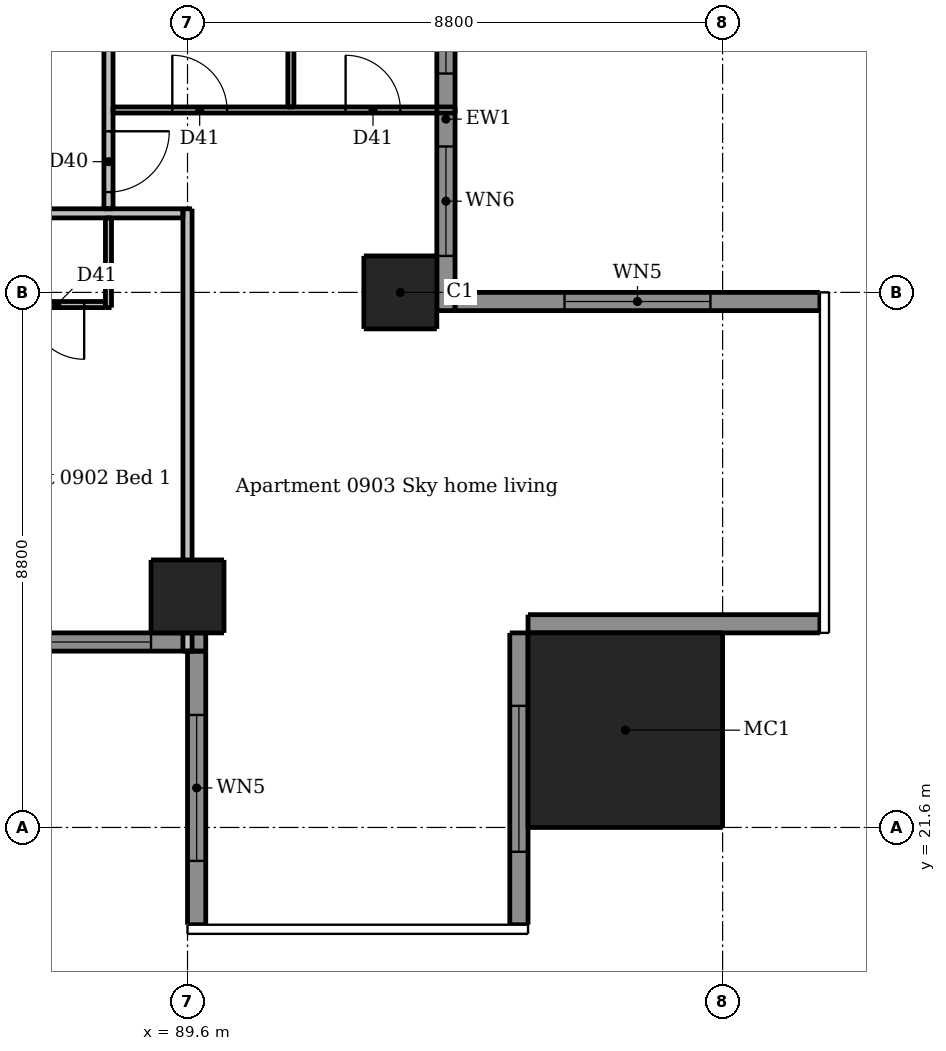
"""IFC4 building model, lengths in metres.
Left out: names, types, materials, properties, quantities, classifications, styles, units other than length and angle.
Written with IfcOpenShell. Run it as: python <this file> out.ifc"""

import sys

from ifc_helpers import new_model, si_unit, direction, frame, frame_2d, origin, origin_2d, place, context, subcontext, project, spatial, rectangle, extrude, element, fill, save


model = new_model("IFC4")
c1 = context("Model", 3, precision=1e-05, world=origin(), true_north=direction((0.0, 1.0)))
c2 = subcontext(c1, "Body", "Model", "MODEL_VIEW")
j1 = project(units=[si_unit("LENGTHUNIT", "METRE"), si_unit("PLANEANGLEUNIT", "RADIAN")], contexts=[c1])
p1 = place(None, origin())
s1 = spatial("IfcSite", under=j1, at=p1, CompositionType="ELEMENT")
p2 = place(p1, origin())
s2 = spatial("IfcBuilding", under=s1, at=p2, CompositionType="ELEMENT")
p3 = place(p2, frame((0.0, 0.0, 36.7)))
s3 = spatial("IfcBuildingStorey", under=s2, at=p3, CompositionType="ELEMENT", Elevation=36.7)
for number, where, z_axis, x_axis in (
    (1, (89.6, 25.4, 0.0), (0.0, 0.0, 1.0), (1.0, 0.0, 0.0)),
    (2, (93.1, 30.4, 0.0), (0.0, 0.0, 1.0), (1.0, 0.0, 0.0)),
):
    element("IfcColumn", number, at=place(p3, frame(where, z_axis=z_axis, x_axis=x_axis)), inside=s3, PredefinedType="COLUMN", context=c2, shape_type="SweptSolid", body=[
        extrude(rectangle(XDim=1.2, YDim=1.2, at=origin_2d()), origin(), (0.0, 0.0, 1.0), 3.05),
    ])
p4 = place(p3, frame((96.8, 23.2, 0.0), z_axis=(0.0, 0.0, 1.0), x_axis=(1.0, 0.0, 0.0)))
e3 = element("IfcColumn", 3, at=p4, inside=s3, PredefinedType="COLUMN", context=c2, shape_type="SweptSolid", body=[
    extrude(rectangle(XDim=3.2, YDim=3.2, at=origin_2d()), origin(), (0.0, 0.0, 1.0), 3.3),
])
p5 = place(p3, frame((89.75, 24.5, 0.0), z_axis=(0.0, 0.0, 1.0), x_axis=(0.0, -1.0, 0.0)))
e4 = element("IfcWall", 4, at=p5, inside=s3, PredefinedType="SOLIDWALL", context=c2, shape_type="SweptSolid", body=[
    extrude(rectangle(XDim=4.5, YDim=0.3, at=frame_2d((2.25, 0.0))), origin(), (0.0, 0.0, 1.0), 3.05),
])
p6 = place(p5, frame((1.05, 0.0, 0.15)))
e5 = element("IfcOpeningElement", 5, at=p6, cuts=e4, PredefinedType="OPENING", context=c2, shape_type="SweptSolid", body=[
    extrude(rectangle(XDim=2.4, YDim=2.1, at=frame_2d((1.2, 1.05))), frame((0.0, 0.16, 0.0), z_axis=(0.0, -1.0, 0.0), x_axis=(1.0, 0.0, 0.0)), (0.0, 0.0, 1.0), 0.32),
])
p7 = place(p3, frame((95.05, 20.0, 0.0), z_axis=(0.0, 0.0, 1.0), x_axis=(0.0, 1.0, 0.0)))
e6 = element("IfcWall", 6, at=p7, inside=s3, PredefinedType="SOLIDWALL", context=c2, shape_type="SweptSolid", body=[
    extrude(rectangle(XDim=4.8, YDim=0.3, at=frame_2d((2.4, 0.0))), origin(), (0.0, 0.0, 1.0), 3.05),
])
p8 = place(p7, frame((1.2, 0.0, 0.15)))
e7 = element("IfcOpeningElement", 7, at=p8, cuts=e6, PredefinedType="OPENING", context=c2, shape_type="SweptSolid", body=[
    extrude(rectangle(XDim=2.4, YDim=2.1, at=frame_2d((1.2, 1.05))), frame((0.0, 0.16, 0.0), z_axis=(0.0, -1.0, 0.0), x_axis=(1.0, 0.0, 0.0)), (0.0, 0.0, 1.0), 0.32),
])
p9 = place(p3, frame((95.2, 24.95, 0.0), z_axis=(0.0, 0.0, 1.0), x_axis=(1.0, 0.0, 0.0)))
e8 = element("IfcWall", 8, at=p9, inside=s3, PredefinedType="SOLIDWALL", context=c2, shape_type="SweptSolid", body=[
    extrude(rectangle(XDim=4.8, YDim=0.3, at=frame_2d((2.4, 0.0))), origin(), (0.0, 0.0, 1.0), 3.05),
])
p10 = place(p3, frame((100.0, 30.25, 0.0), z_axis=(0.0, 0.0, 1.0), x_axis=(-1.0, 0.0, 0.0)))
e9 = element("IfcWall", 9, at=p10, inside=s3, PredefinedType="SOLIDWALL", context=c2, shape_type="SweptSolid", body=[
    extrude(rectangle(XDim=6.0, YDim=0.3, at=frame_2d((3.0, 0.0))), origin(), (0.0, 0.0, 1.0), 3.05),
])
p11 = place(p10, frame((1.8, 0.0, 0.15)))
e10 = element("IfcOpeningElement", 10, at=p11, cuts=e9, PredefinedType="OPENING", context=c2, shape_type="SweptSolid", body=[
    extrude(rectangle(XDim=2.4, YDim=2.1, at=frame_2d((1.2, 1.05))), frame((0.0, 0.16, 0.0), z_axis=(0.0, -1.0, 0.0), x_axis=(1.0, 0.0, 0.0)), (0.0, 0.0, 1.0), 0.32),
])
p12 = place(p3, frame((83.6, 24.65, 0.0), z_axis=(0.0, 0.0, 1.0), x_axis=(1.0, 0.0, 0.0)))
e11 = element("IfcWall", 11, at=p12, inside=s3, PredefinedType="SOLIDWALL", context=c2, shape_type="SweptSolid", body=[
    extrude(rectangle(XDim=6.3, YDim=0.3, at=frame_2d((3.15, 0.0))), origin(), (0.0, 0.0, 1.0), 3.05),
])
p13 = place(p12, frame((0.6, 0.0, 0.15)))
e12 = element("IfcOpeningElement", 12, at=p13, cuts=e11, PredefinedType="OPENING", context=c2, shape_type="SweptSolid", body=[
    extrude(rectangle(XDim=1.8, YDim=2.1, at=frame_2d((0.9, 1.05))), frame((0.0, 0.16, 0.0), z_axis=(0.0, -1.0, 0.0), x_axis=(1.0, 0.0, 0.0)), (0.0, 0.0, 1.0), 0.32),
])
p14 = place(p12, frame((3.6, 0.0, 0.15)))
e13 = element("IfcOpeningElement", 13, at=p14, cuts=e11, PredefinedType="OPENING", context=c2, shape_type="SweptSolid", body=[
    extrude(rectangle(XDim=1.8, YDim=2.1, at=frame_2d((0.9, 1.05))), frame((0.0, 0.16, 0.0), z_axis=(0.0, -1.0, 0.0), x_axis=(1.0, 0.0, 0.0)), (0.0, 0.0, 1.0), 0.32),
])
p15 = place(p3, frame((93.85, 30.1, 0.0), z_axis=(0.0, 0.0, 1.0), x_axis=(0.0, 1.0, 0.0)))
e14 = element("IfcWall", 14, at=p15, inside=s3, PredefinedType="SOLIDWALL", context=c2, shape_type="SweptSolid", body=[
    extrude(rectangle(XDim=6.3, YDim=0.3, at=frame_2d((3.15, 0.0))), origin(), (0.0, 0.0, 1.0), 3.05),
])
p16 = place(p15, frame((0.9, 0.0, 0.15)))
e15 = element("IfcOpeningElement", 15, at=p16, cuts=e14, PredefinedType="OPENING", context=c2, shape_type="SweptSolid", body=[
    extrude(rectangle(XDim=1.8, YDim=2.1, at=frame_2d((0.9, 1.05))), frame((0.0, 0.16, 0.0), z_axis=(0.0, -1.0, 0.0), x_axis=(1.0, 0.0, 0.0)), (0.0, 0.0, 1.0), 0.32),
])
p17 = place(p15, frame((3.9, 0.0, 0.15)))
e16 = element("IfcOpeningElement", 16, at=p17, cuts=e14, PredefinedType="OPENING", context=c2, shape_type="SweptSolid", body=[
    extrude(rectangle(XDim=1.8, YDim=2.1, at=frame_2d((0.9, 1.05))), frame((0.0, 0.16, 0.0), z_axis=(0.0, -1.0, 0.0), x_axis=(1.0, 0.0, 0.0)), (0.0, 0.0, 1.0), 0.32),
])
p18 = place(p3, frame((88.3, 30.15, 0.0), z_axis=(0.0, 0.0, 1.0), x_axis=(0.0, 1.0, 0.0)))
e17 = element("IfcWall", 17, at=p18, inside=s3, PredefinedType="PARTITIONING", context=c2, shape_type="SweptSolid", body=[
    extrude(rectangle(XDim=1.475, YDim=0.1, at=frame_2d((0.738, 0.0))), origin(), (0.0, 0.0, 1.0), 3.05),
])
p19 = place(p3, frame((91.3, 33.45, 0.0), z_axis=(0.0, 0.0, 1.0), x_axis=(0.0, 1.0, 0.0)))
e18 = element("IfcWall", 18, at=p19, inside=s3, PredefinedType="PARTITIONING", context=c2, shape_type="SweptSolid", body=[
    extrude(rectangle(XDim=5.875, YDim=0.1, at=frame_2d((2.938, 0.0))), origin(), (0.0, 0.0, 1.0), 3.05),
])
p20 = place(p19, frame((3.75, 0.0, 0.0)))
e19 = element("IfcOpeningElement", 19, at=p20, cuts=e18, PredefinedType="OPENING", context=c2, shape_type="SweptSolid", body=[
    extrude(rectangle(XDim=0.8, YDim=2.1, at=frame_2d((0.4, 1.05))), frame((0.0, 0.06, 0.0), z_axis=(0.0, -1.0, 0.0), x_axis=(1.0, 0.0, 0.0)), (0.0, 0.0, 1.0), 0.12),
])
p21 = place(p3, frame((88.375, 33.4, 0.0), z_axis=(0.0, 0.0, 1.0), x_axis=(1.0, 0.0, 0.0)))
e20 = element("IfcWall", 20, at=p21, inside=s3, PredefinedType="PARTITIONING", context=c2, shape_type="SweptSolid", body=[
    extrude(rectangle(XDim=5.625, YDim=0.1, at=frame_2d((2.812, 0.0))), origin(), (0.0, 0.0, 1.0), 3.05),
])
p22 = place(p21, frame((0.975, 0.0, 0.0)))
e21 = element("IfcOpeningElement", 21, at=p22, cuts=e20, PredefinedType="OPENING", context=c2, shape_type="SweptSolid", body=[
    extrude(rectangle(XDim=0.9, YDim=2.1, at=frame_2d((0.45, 1.05))), frame((0.0, 0.06, 0.0), z_axis=(0.0, -1.0, 0.0), x_axis=(1.0, 0.0, 0.0)), (0.0, 0.0, 1.0), 0.12),
])
p23 = place(p21, frame((3.825, 0.0, 0.0)))
e22 = element("IfcOpeningElement", 22, at=p23, cuts=e20, PredefinedType="OPENING", context=c2, shape_type="SweptSolid", body=[
    extrude(rectangle(XDim=0.9, YDim=2.1, at=frame_2d((0.45, 1.05))), frame((0.0, 0.06, 0.0), z_axis=(0.0, -1.0, 0.0), x_axis=(1.0, 0.0, 0.0)), (0.0, 0.0, 1.0), 0.12),
])
p24 = place(p3, frame((88.25, 30.2, 0.0), z_axis=(0.0, 0.0, 1.0), x_axis=(-1.0, 0.0, 0.0)))
e23 = element("IfcWall", 23, at=p24, inside=s3, PredefinedType="PARTITIONING", context=c2, shape_type="SweptSolid", body=[
    extrude(rectangle(XDim=13.575, YDim=0.1, at=frame_2d((6.788, 0.0))), origin(), (0.0, 0.0, 1.0), 3.05),
])
p25 = place(p24, frame((7.5, 0.0, 0.0)))
e24 = element("IfcOpeningElement", 24, at=p25, cuts=e23, PredefinedType="OPENING", context=c2, shape_type="SweptSolid", body=[
    extrude(rectangle(XDim=0.9, YDim=2.1, at=frame_2d((0.45, 1.05))), frame((0.0, 0.06, 0.0), z_axis=(0.0, -1.0, 0.0), x_axis=(1.0, 0.0, 0.0)), (0.0, 0.0, 1.0), 0.12),
])
p26 = place(p24, frame((2.7, 0.0, 0.0)))
e25 = element("IfcOpeningElement", 25, at=p26, cuts=e23, PredefinedType="OPENING", context=c2, shape_type="SweptSolid", body=[
    extrude(rectangle(XDim=0.9, YDim=2.1, at=frame_2d((0.45, 1.05))), frame((0.0, 0.06, 0.0), z_axis=(0.0, -1.0, 0.0), x_axis=(1.0, 0.0, 0.0)), (0.0, 0.0, 1.0), 0.12),
])
p27 = place(p24, frame((0.35, 0.0, 0.0)))
e26 = element("IfcOpeningElement", 26, at=p27, cuts=e23, PredefinedType="OPENING", context=c2, shape_type="SweptSolid", body=[
    extrude(rectangle(XDim=0.9, YDim=2.1, at=frame_2d((0.45, 1.05))), frame((0.0, 0.06, 0.0), z_axis=(0.0, -1.0, 0.0), x_axis=(1.0, 0.0, 0.0)), (0.0, 0.0, 1.0), 0.12),
])
p28 = place(p24, frame((12.05, 0.0, 0.0)))
e27 = element("IfcOpeningElement", 27, at=p28, cuts=e23, PredefinedType="OPENING", context=c2, shape_type="SweptSolid", body=[
    extrude(rectangle(XDim=0.8, YDim=2.1, at=frame_2d((0.4, 1.05))), frame((0.0, 0.06, 0.0), z_axis=(0.0, -1.0, 0.0), x_axis=(1.0, 0.0, 0.0)), (0.0, 0.0, 1.0), 0.12),
])
p29 = place(p3, frame((88.3, 60.475, 0.0), z_axis=(0.0, 0.0, 1.0), x_axis=(0.0, -1.0, 0.0)))
e28 = element("IfcWall", 28, at=p29, inside=s3, PredefinedType="PARTITIONING", context=c2, shape_type="SweptSolid", body=[
    extrude(rectangle(XDim=28.7, YDim=0.15, at=frame_2d((14.35, 0.0))), origin(), (0.0, 0.0, 1.0), 3.05),
])
p30 = place(p29, frame((27.425, 0.0, 0.0)))
e29 = element("IfcOpeningElement", 29, at=p30, cuts=e28, PredefinedType="OPENING", context=c2, shape_type="SweptSolid", body=[
    extrude(rectangle(XDim=1.0, YDim=2.1, at=frame_2d((0.5, 1.05))), frame((0.0, 0.085, 0.0), z_axis=(0.0, -1.0, 0.0), x_axis=(1.0, 0.0, 0.0)), (0.0, 0.0, 1.0), 0.17),
])
p31 = place(p29, frame((10.625, 0.0, 0.0)))
e30 = element("IfcOpeningElement", 30, at=p31, cuts=e28, PredefinedType="OPENING", context=c2, shape_type="SweptSolid", body=[
    extrude(rectangle(XDim=1.0, YDim=2.1, at=frame_2d((0.5, 1.05))), frame((0.0, 0.085, 0.0), z_axis=(0.0, -1.0, 0.0), x_axis=(1.0, 0.0, 0.0)), (0.0, 0.0, 1.0), 0.17),
])
p32 = place(p3, frame((89.6, 24.5, 0.0), z_axis=(0.0, 0.0, 1.0), x_axis=(0.0, 1.0, 0.0)))
e31 = element("IfcWall", 31, at=p32, inside=s3, PredefinedType="PARTITIONING", context=c2, shape_type="SweptSolid", body=[
    extrude(rectangle(XDim=7.275, YDim=0.15, at=frame_2d((3.637, 0.0))), origin(), (0.0, 0.0, 1.0), 2.516),
])
p33 = place(p3, frame((89.525, 31.7, 0.0), z_axis=(0.0, 0.0, 1.0), x_axis=(-1.0, 0.0, 0.0)))
e32 = element("IfcWall", 32, at=p33, inside=s3, PredefinedType="PARTITIONING", context=c2, shape_type="SweptSolid", body=[
    extrude(rectangle(XDim=28.75, YDim=0.15, at=frame_2d((14.375, 0.0))), origin(), (0.0, 0.0, 1.0), 3.05),
])
p34 = place(p33, frame((24.475, 0.0, 0.0)))
e33 = element("IfcOpeningElement", 33, at=p34, cuts=e32, PredefinedType="OPENING", context=c2, shape_type="SweptSolid", body=[
    extrude(rectangle(XDim=1.0, YDim=2.1, at=frame_2d((0.5, 1.05))), frame((0.0, 0.085, 0.0), z_axis=(0.0, -1.0, 0.0), x_axis=(1.0, 0.0, 0.0)), (0.0, 0.0, 1.0), 0.17),
])
p35 = place(p33, frame((7.575, 0.0, 0.0)))
e34 = element("IfcOpeningElement", 34, at=p35, cuts=e32, PredefinedType="OPENING", context=c2, shape_type="SweptSolid", body=[
    extrude(rectangle(XDim=1.0, YDim=2.1, at=frame_2d((0.5, 1.05))), frame((0.0, 0.085, 0.0), z_axis=(0.0, -1.0, 0.0), x_axis=(1.0, 0.0, 0.0)), (0.0, 0.0, 1.0), 0.17),
])
p36 = place(p6, origin())
e35 = element("IfcWindow", 35, at=p36, inside=s3, PartitioningType="DOUBLE_PANEL_VERTICAL", PredefinedType="WINDOW", context=c2, shape_type="SweptSolid", body=[
    extrude(rectangle(XDim=2.4, YDim=2.1, at=frame_2d((1.2, 1.05))), frame((0.0, 0.03, 0.0), z_axis=(0.0, -1.0, 0.0), x_axis=(1.0, 0.0, 0.0)), (0.0, 0.0, 1.0), 0.06),
])
fill(e5, e35)
p37 = place(p8, origin())
e36 = element("IfcWindow", 36, at=p37, inside=s3, PartitioningType="DOUBLE_PANEL_VERTICAL", PredefinedType="WINDOW", context=c2, shape_type="SweptSolid", body=[
    extrude(rectangle(XDim=2.4, YDim=2.1, at=frame_2d((1.2, 1.05))), frame((0.0, 0.03, 0.0), z_axis=(0.0, -1.0, 0.0), x_axis=(1.0, 0.0, 0.0)), (0.0, 0.0, 1.0), 0.06),
])
fill(e7, e36)
p38 = place(p11, origin())
e37 = element("IfcWindow", 37, at=p38, inside=s3, PartitioningType="DOUBLE_PANEL_VERTICAL", PredefinedType="WINDOW", context=c2, shape_type="SweptSolid", body=[
    extrude(rectangle(XDim=2.4, YDim=2.1, at=frame_2d((1.2, 1.05))), frame((0.0, 0.03, 0.0), z_axis=(0.0, -1.0, 0.0), x_axis=(1.0, 0.0, 0.0)), (0.0, 0.0, 1.0), 0.06),
])
fill(e10, e37)
p39 = place(p14, origin())
e38 = element("IfcWindow", 38, at=p39, inside=s3, PartitioningType="DOUBLE_PANEL_VERTICAL", PredefinedType="WINDOW", context=c2, shape_type="SweptSolid", body=[
    extrude(rectangle(XDim=1.8, YDim=2.1, at=frame_2d((0.9, 1.05))), frame((0.0, 0.03, 0.0), z_axis=(0.0, -1.0, 0.0), x_axis=(1.0, 0.0, 0.0)), (0.0, 0.0, 1.0), 0.06),
])
fill(e13, e38)
p40 = place(p16, origin())
e39 = element("IfcWindow", 39, at=p40, inside=s3, PartitioningType="DOUBLE_PANEL_VERTICAL", PredefinedType="WINDOW", context=c2, shape_type="SweptSolid", body=[
    extrude(rectangle(XDim=1.8, YDim=2.1, at=frame_2d((0.9, 1.05))), frame((0.0, 0.03, 0.0), z_axis=(0.0, -1.0, 0.0), x_axis=(1.0, 0.0, 0.0)), (0.0, 0.0, 1.0), 0.06),
])
fill(e15, e39)
p41 = place(p17, origin())
e40 = element("IfcWindow", 40, at=p41, inside=s3, PartitioningType="DOUBLE_PANEL_VERTICAL", PredefinedType="WINDOW", context=c2, shape_type="SweptSolid", body=[
    extrude(rectangle(XDim=1.8, YDim=2.1, at=frame_2d((0.9, 1.05))), frame((0.0, 0.03, 0.0), z_axis=(0.0, -1.0, 0.0), x_axis=(1.0, 0.0, 0.0)), (0.0, 0.0, 1.0), 0.06),
])
fill(e16, e40)
p42 = place(p27, origin())
e41 = element("IfcDoor", 41, at=p42, inside=s3, OperationType="SINGLE_SWING_LEFT", PredefinedType="DOOR", context=c2, shape_type="SweptSolid", body=[
    extrude(rectangle(XDim=0.9, YDim=2.1, at=frame_2d((0.45, 1.05))), frame((0.0, 0.025, 0.0), z_axis=(0.0, -1.0, 0.0), x_axis=(1.0, 0.0, 0.0)), (0.0, 0.0, 1.0), 0.05),
])
fill(e26, e41)
p43 = place(p30, origin())
e42 = element("IfcDoor", 42, at=p43, inside=s3, OperationType="SINGLE_SWING_LEFT", PredefinedType="DOOR", context=c2, shape_type="SweptSolid", body=[
    extrude(rectangle(XDim=1.0, YDim=2.1, at=frame_2d((0.5, 1.05))), frame((0.0, 0.025, 0.0), z_axis=(0.0, -1.0, 0.0), x_axis=(1.0, 0.0, 0.0)), (0.0, 0.0, 1.0), 0.05),
])
fill(e29, e42)
p44 = place(p22, origin())
e43 = element("IfcDoor", 43, at=p44, inside=s3, OperationType="SINGLE_SWING_LEFT", PredefinedType="DOOR", context=c2, shape_type="SweptSolid", body=[
    extrude(rectangle(XDim=0.9, YDim=2.1, at=frame_2d((0.45, 1.05))), frame((0.0, 0.025, 0.0), z_axis=(0.0, -1.0, 0.0), x_axis=(1.0, 0.0, 0.0)), (0.0, 0.0, 1.0), 0.05),
])
fill(e21, e43)
p45 = place(p23, origin())
e44 = element("IfcDoor", 44, at=p45, inside=s3, OperationType="SINGLE_SWING_LEFT", PredefinedType="DOOR", context=c2, shape_type="SweptSolid", body=[
    extrude(rectangle(XDim=0.9, YDim=2.1, at=frame_2d((0.45, 1.05))), frame((0.0, 0.025, 0.0), z_axis=(0.0, -1.0, 0.0), x_axis=(1.0, 0.0, 0.0)), (0.0, 0.0, 1.0), 0.05),
])
fill(e22, e44)
save(model, sys.argv[1])
